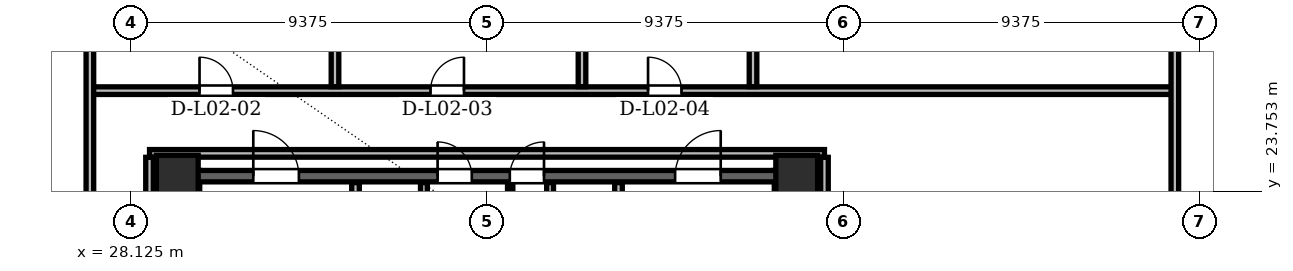
"""IFC4 building model, lengths in metres.
Left out: names, types, materials, properties, quantities, classifications, styles, units other than length and angle.
Written with IfcOpenShell. Run it as: python <this file> out.ifc"""

import sys

from ifc_helpers import new_model, si_unit, direction, frame, frame_2d, origin, origin_2d, place, context, subcontext, project, spatial, rectangle, hollow_rectangle, extrude, element, fill, save


model = new_model("IFC4")
c1 = context("Model", 3, precision=1e-05, world=origin(), true_north=direction((0.0, 1.0)))
c2 = subcontext(c1, "Body", "Model", "MODEL_VIEW")
j1 = project(units=[si_unit("LENGTHUNIT", "METRE"), si_unit("PLANEANGLEUNIT", "RADIAN")], contexts=[c1])
p1 = place(None, origin())
s1 = spatial("IfcSite", under=j1, at=p1, CompositionType="ELEMENT")
p2 = place(p1, origin())
s2 = spatial("IfcBuilding", under=s1, at=p2, CompositionType="ELEMENT")
p3 = place(p2, frame((0.0, 0.0, 9.9)))
s3 = spatial("IfcBuildingStorey", under=s2, at=p3, CompositionType="ELEMENT", Elevation=9.9)
for number, where, z_axis, x_axis in (
    (1, (45.65, 24.15, 0.0), (0.0, 0.0, 1.0), (1.0, 0.0, 0.0)),
    (2, (29.35, 24.15, 0.0), (0.0, 0.0, 1.0), (1.0, 0.0, 0.0)),
):
    element("IfcColumn", number, at=place(p3, frame(where, z_axis=z_axis, x_axis=x_axis)), inside=s3, PredefinedType="COLUMN", context=c2, shape_type="SweptSolid", body=[
        extrude(hollow_rectangle(XDim=1.1, YDim=1.1, WallThickness=0.09, at=origin_2d()), origin(), (0.0, 0.0, 1.0), 4.2),
    ])
for number, where, z_axis, x_axis in (
    (3, (29.64, 11.0, 0.0), (0.0, 0.0, 1.0), (0.0, 1.0, 0.0)),
    (4, (45.36, 11.0, 0.0), (0.0, 0.0, 1.0), (0.0, 1.0, 0.0)),
):
    element("IfcWall", number, at=place(p3, frame(where, z_axis=z_axis, x_axis=x_axis)), inside=s3, PredefinedType="SHEAR", context=c2, shape_type="SweptSolid", body=[
        extrude(rectangle(XDim=13.3, YDim=0.6, at=frame_2d((6.65, 0.0))), origin(), (0.0, 0.0, 1.0), 3.92),
    ])
p4 = place(p3, frame((29.65, 24.15, 0.0), z_axis=(0.0, 0.0, 1.0), x_axis=(1.0, 0.0, 0.0)))
e5 = element("IfcWall", 5, at=p4, inside=s3, PredefinedType="SHEAR", context=c2, shape_type="SweptSolid", body=[
    extrude(rectangle(XDim=15.7, YDim=0.3, at=frame_2d((7.85, 0.0))), origin(), (0.0, 0.0, 1.0), 3.92),
])
p5 = place(p4, frame((1.7, 0.0, 0.0)))
e6 = element("IfcOpeningElement", 6, at=p5, cuts=e5, PredefinedType="OPENING", context=c2, shape_type="SweptSolid", body=[
    extrude(rectangle(XDim=1.2, YDim=2.2, at=frame_2d((0.6, 1.1))), frame((0.0, 0.15, 0.0), z_axis=(0.0, -1.0, 0.0), x_axis=(1.0, 0.0, 0.0)), (0.0, 0.0, 1.0), 0.3),
])
p6 = place(p4, frame((12.8, 0.0, 0.0)))
e7 = element("IfcOpeningElement", 7, at=p6, cuts=e5, PredefinedType="OPENING", context=c2, shape_type="SweptSolid", body=[
    extrude(rectangle(XDim=1.2, YDim=2.2, at=frame_2d((0.6, 1.1))), frame((0.0, 0.15, 0.0), z_axis=(0.0, -1.0, 0.0), x_axis=(1.0, 0.0, 0.0)), (0.0, 0.0, 1.0), 0.3),
])
p7 = place(p4, frame((6.55, 0.0, 0.0)))
e8 = element("IfcOpeningElement", 8, at=p7, cuts=e5, PredefinedType="OPENING", context=c2, shape_type="SweptSolid", body=[
    extrude(rectangle(XDim=0.9, YDim=2.05, at=frame_2d((0.45, 1.025))), frame((0.0, 0.15, 0.0), z_axis=(0.0, -1.0, 0.0), x_axis=(1.0, 0.0, 0.0)), (0.0, 0.0, 1.0), 0.3),
])
p8 = place(p4, frame((8.45, 0.0, 0.0)))
e9 = element("IfcOpeningElement", 9, at=p8, cuts=e5, PredefinedType="OPENING", context=c2, shape_type="SweptSolid", body=[
    extrude(rectangle(XDim=0.9, YDim=2.05, at=frame_2d((0.45, 1.025))), frame((0.0, 0.15, 0.0), z_axis=(0.0, -1.0, 0.0), x_axis=(1.0, 0.0, 0.0)), (0.0, 0.0, 1.0), 0.3),
])
p9 = place(p3, frame((34.04, 19.48, 0.0), z_axis=(0.0, 0.0, 1.0), x_axis=(0.0, 1.0, 0.0)))
e10 = element("IfcWall", 10, at=p9, inside=s3, PredefinedType="PARTITIONING", context=c2, shape_type="SweptSolid", body=[
    extrude(rectangle(XDim=4.5, YDim=0.2, at=frame_2d((2.25, 0.0))), origin(), (0.0, 0.0, 1.0), 2.96),
])
p10 = place(p9, frame((2.12, 0.0, 0.0)))
e11 = element("IfcOpeningElement", 11, at=p10, cuts=e10, PredefinedType="OPENING", context=c2, shape_type="SweptSolid", body=[
    extrude(rectangle(XDim=1.1, YDim=2.2, at=frame_2d((0.55, 1.1))), frame((0.0, 0.1, 0.0), z_axis=(0.0, -1.0, 0.0), x_axis=(1.0, 0.0, 0.0)), (0.0, 0.0, 1.0), 0.2),
])
p11 = place(p3, frame((35.84, 20.96, 0.0), z_axis=(0.0, 0.0, 1.0), x_axis=(0.0, 1.0, 0.0)))
e12 = element("IfcWall", 12, at=p11, inside=s3, PredefinedType="PARTITIONING", context=c2, shape_type="SweptSolid", body=[
    extrude(rectangle(XDim=3.02, YDim=0.18, at=frame_2d((1.51, 0.0))), origin(), (0.0, 0.0, 1.0), 2.96),
])
p12 = place(p3, frame((40.96, 19.48, 0.0), z_axis=(0.0, 0.0, 1.0), x_axis=(0.0, 1.0, 0.0)))
e13 = element("IfcWall", 13, at=p12, inside=s3, PredefinedType="PARTITIONING", context=c2, shape_type="SweptSolid", body=[
    extrude(rectangle(XDim=4.5, YDim=0.2, at=frame_2d((2.25, 0.0))), origin(), (0.0, 0.0, 1.0), 2.96),
])
p13 = place(p12, frame((2.12, 0.0, 0.0)))
e14 = element("IfcOpeningElement", 14, at=p13, cuts=e13, PredefinedType="OPENING", context=c2, shape_type="SweptSolid", body=[
    extrude(rectangle(XDim=1.1, YDim=2.2, at=frame_2d((0.55, 1.1))), frame((0.0, 0.1, 0.0), z_axis=(0.0, -1.0, 0.0), x_axis=(1.0, 0.0, 0.0)), (0.0, 0.0, 1.0), 0.2),
])
p14 = place(p3, frame((39.16, 20.96, 0.0), z_axis=(0.0, 0.0, 1.0), x_axis=(0.0, 1.0, 0.0)))
e15 = element("IfcWall", 15, at=p14, inside=s3, PredefinedType="PARTITIONING", context=c2, shape_type="SweptSolid", body=[
    extrude(rectangle(XDim=3.02, YDim=0.18, at=frame_2d((1.51, 0.0))), origin(), (0.0, 0.0, 1.0), 2.96),
])
p15 = place(p3, frame((38.11, 21.06, 0.0), z_axis=(0.0, 0.0, 1.0), x_axis=(0.0, 1.0, 0.0)))
e16 = element("IfcWall", 16, at=p15, inside=s3, PredefinedType="PARTITIONING", context=c2, shape_type="SweptSolid", body=[
    extrude(rectangle(XDim=2.92, YDim=0.14, at=frame_2d((1.46, 0.0))), origin(), (0.0, 0.0, 1.0), 2.96),
])
p16 = place(p3, frame((28.62, 24.75, 0.0), z_axis=(0.0, 0.0, 1.0), x_axis=(1.0, 0.0, 0.0)))
e17 = element("IfcWall", 17, at=p16, inside=s3, PredefinedType="PARTITIONING", context=c2, shape_type="SweptSolid", body=[
    extrude(rectangle(XDim=17.76, YDim=0.2, at=frame_2d((8.88, 0.0))), origin(), (0.0, 0.0, 1.0), 2.983),
])
p17 = place(p3, frame((27.05, 26.4, 0.0), z_axis=(0.0, 0.0, 1.0), x_axis=(1.0, 0.0, 0.0)))
e18 = element("IfcWall", 18, at=p17, inside=s3, PredefinedType="PARTITIONING", context=c2, shape_type="SweptSolid", body=[
    extrude(rectangle(XDim=28.55, YDim=0.2, at=frame_2d((14.275, 0.0))), origin(), (0.0, 0.0, 1.0), 2.983),
])
p18 = place(p17, frame((2.885, 0.0, 0.0)))
e19 = element("IfcOpeningElement", 19, at=p18, cuts=e18, PredefinedType="OPENING", context=c2, shape_type="SweptSolid", body=[
    extrude(rectangle(XDim=0.88, YDim=2.08, at=frame_2d((0.44, 1.04))), frame((0.0, 0.1, 0.0), z_axis=(0.0, -1.0, 0.0), x_axis=(1.0, 0.0, 0.0)), (0.0, 0.0, 1.0), 0.2),
])
p19 = place(p17, frame((8.964, 0.0, 0.0)))
e20 = element("IfcOpeningElement", 20, at=p19, cuts=e18, PredefinedType="OPENING", context=c2, shape_type="SweptSolid", body=[
    extrude(rectangle(XDim=0.88, YDim=2.08, at=frame_2d((0.44, 1.04))), frame((0.0, 0.1, 0.0), z_axis=(0.0, -1.0, 0.0), x_axis=(1.0, 0.0, 0.0)), (0.0, 0.0, 1.0), 0.2),
])
p20 = place(p17, frame((14.688, 0.0, 0.0)))
e21 = element("IfcOpeningElement", 21, at=p20, cuts=e18, PredefinedType="OPENING", context=c2, shape_type="SweptSolid", body=[
    extrude(rectangle(XDim=0.88, YDim=2.08, at=frame_2d((0.44, 1.04))), frame((0.0, 0.1, 0.0), z_axis=(0.0, -1.0, 0.0), x_axis=(1.0, 0.0, 0.0)), (0.0, 0.0, 1.0), 0.2),
])
p21 = place(p3, frame((27.05, 10.504, 0.0), z_axis=(0.0, 0.0, 1.0), x_axis=(0.0, 1.0, 0.0)))
e22 = element("IfcWall", 22, at=p21, inside=s3, PredefinedType="PARTITIONING", context=c2, shape_type="SweptSolid", body=[
    extrude(rectangle(XDim=28.376, YDim=0.2, at=frame_2d((14.188, 0.0))), origin(), (0.0, 0.0, 1.0), 2.983),
])
p22 = place(p21, frame((5.975, 0.0, 0.0)))
e23 = element("IfcOpeningElement", 23, at=p22, cuts=e22, PredefinedType="OPENING", context=c2, shape_type="SweptSolid", body=[
    extrude(rectangle(XDim=1.3, YDim=2.2, at=frame_2d((0.65, 1.1))), frame((0.0, 0.1, 0.0), z_axis=(0.0, -1.0, 0.0), x_axis=(1.0, 0.0, 0.0)), (0.0, 0.0, 1.0), 0.2),
])
p23 = place(p3, frame((28.62, 10.504, 0.0), z_axis=(0.0, 0.0, 1.0), x_axis=(0.0, 1.0, 0.0)))
e24 = element("IfcWall", 24, at=p23, inside=s3, PredefinedType="PARTITIONING", context=c2, shape_type="SweptSolid", body=[
    extrude(rectangle(XDim=14.142, YDim=0.2, at=frame_2d((7.071, 0.0))), origin(), (0.0, 0.0, 1.0), 2.983),
])
for number, where, z_axis, x_axis in (
    (25, (33.5, 26.504, 0.0), (0.0, 0.0, 1.0), (0.0, 1.0, 0.0)),
    (26, (40.0, 26.504, 0.0), (0.0, 0.0, 1.0), (0.0, 1.0, 0.0)),
):
    element("IfcWall", number, at=place(p3, frame(where, z_axis=z_axis, x_axis=x_axis)), inside=s3, PredefinedType="PARTITIONING", context=c2, shape_type="SweptSolid", body=[
        extrude(rectangle(XDim=6.892, YDim=0.2, at=frame_2d((3.446, 0.0))), origin(), (0.0, 0.0, 1.0), 3.92),
    ])
p24 = place(p3, frame((44.5, 26.504, 0.0), z_axis=(0.0, 0.0, 1.0), x_axis=(0.0, 1.0, 0.0)))
e27 = element("IfcWall", 27, at=p24, inside=s3, PredefinedType="PARTITIONING", context=c2, shape_type="SweptSolid", body=[
    extrude(rectangle(XDim=3.592, YDim=0.2, at=frame_2d((1.796, 0.0))), origin(), (0.0, 0.0, 1.0), 3.92),
])
p25 = place(p3, frame((46.38, 10.504, 0.0), z_axis=(0.0, 0.0, 1.0), x_axis=(0.0, 1.0, 0.0)))
e28 = element("IfcWall", 28, at=p25, inside=s3, PredefinedType="PARTITIONING", context=c2, shape_type="SweptSolid", body=[
    extrude(rectangle(XDim=14.142, YDim=0.2, at=frame_2d((7.071, 0.0))), origin(), (0.0, 0.0, 1.0), 3.92),
])
p26 = place(p3, frame((55.6, 18.889, 0.0), z_axis=(0.0, 0.0, 1.0), x_axis=(0.0, 1.0, 0.0)))
e29 = element("IfcWall", 29, at=p26, inside=s3, PredefinedType="PARTITIONING", context=c2, shape_type="SweptSolid", body=[
    extrude(rectangle(XDim=24.867, YDim=0.2, at=frame_2d((12.433, 0.0))), origin(), (0.0, 0.0, 1.0), 2.71),
])
p27 = place(p26, frame((2.356, 0.0, 0.0)))
e30 = element("IfcOpeningElement", 30, at=p27, cuts=e29, PredefinedType="OPENING", context=c2, shape_type="SweptSolid", body=[
    extrude(rectangle(XDim=1.3, YDim=2.2, at=frame_2d((0.65, 1.1))), frame((0.0, 0.1, 0.0), z_axis=(0.0, -1.0, 0.0), x_axis=(1.0, 0.0, 0.0)), (0.0, 0.0, 1.0), 0.2),
])
p28 = place(p5, origin())
e31 = element("IfcDoor", 31, at=p28, inside=s3, OperationType="SINGLE_SWING_LEFT", PredefinedType="DOOR", context=c2, shape_type="SweptSolid", body=[
    extrude(rectangle(XDim=1.2, YDim=2.2, at=frame_2d((0.6, 1.1))), frame((0.0, 0.025, 0.0), z_axis=(0.0, -1.0, 0.0), x_axis=(1.0, 0.0, 0.0)), (0.0, 0.0, 1.0), 0.05),
])
fill(e6, e31)
p29 = place(p6, origin())
e32 = element("IfcDoor", 32, at=p29, inside=s3, OperationType="SINGLE_SWING_RIGHT", PredefinedType="DOOR", context=c2, shape_type="SweptSolid", body=[
    extrude(rectangle(XDim=1.2, YDim=2.2, at=frame_2d((0.6, 1.1))), frame((0.0, 0.025, 0.0), z_axis=(0.0, -1.0, 0.0), x_axis=(1.0, 0.0, 0.0)), (0.0, 0.0, 1.0), 0.05),
])
fill(e7, e32)
p30 = place(p7, origin())
e33 = element("IfcDoor", 33, at=p30, inside=s3, OperationType="SINGLE_SWING_LEFT", PredefinedType="DOOR", context=c2, shape_type="SweptSolid", body=[
    extrude(rectangle(XDim=0.9, YDim=2.05, at=frame_2d((0.45, 1.025))), frame((0.0, 0.025, 0.0), z_axis=(0.0, -1.0, 0.0), x_axis=(1.0, 0.0, 0.0)), (0.0, 0.0, 1.0), 0.05),
])
fill(e8, e33)
p31 = place(p8, origin())
e34 = element("IfcDoor", 34, at=p31, inside=s3, OperationType="SINGLE_SWING_RIGHT", PredefinedType="DOOR", context=c2, shape_type="SweptSolid", body=[
    extrude(rectangle(XDim=0.9, YDim=2.05, at=frame_2d((0.45, 1.025))), frame((0.0, 0.025, 0.0), z_axis=(0.0, -1.0, 0.0), x_axis=(1.0, 0.0, 0.0)), (0.0, 0.0, 1.0), 0.05),
])
fill(e9, e34)
p32 = place(p18, origin())
e35 = element("IfcDoor", 35, at=p32, inside=s3, OperationType="SINGLE_SWING_LEFT", PredefinedType="DOOR", context=c2, shape_type="SweptSolid", body=[
    extrude(rectangle(XDim=0.88, YDim=2.08, at=frame_2d((0.44, 1.04))), frame((0.0, 0.025, 0.0), z_axis=(0.0, -1.0, 0.0), x_axis=(1.0, 0.0, 0.0)), (0.0, 0.0, 1.0), 0.05),
])
fill(e19, e35)
p33 = place(p19, origin())
e36 = element("IfcDoor", 36, at=p33, inside=s3, OperationType="SINGLE_SWING_RIGHT", PredefinedType="DOOR", context=c2, shape_type="SweptSolid", body=[
    extrude(rectangle(XDim=0.88, YDim=2.08, at=frame_2d((0.44, 1.04))), frame((0.0, 0.025, 0.0), z_axis=(0.0, -1.0, 0.0), x_axis=(1.0, 0.0, 0.0)), (0.0, 0.0, 1.0), 0.05),
])
fill(e20, e36)
p34 = place(p20, origin())
e37 = element("IfcDoor", 37, at=p34, inside=s3, OperationType="SINGLE_SWING_LEFT", PredefinedType="DOOR", context=c2, shape_type="SweptSolid", body=[
    extrude(rectangle(XDim=0.88, YDim=2.08, at=frame_2d((0.44, 1.04))), frame((0.0, 0.025, 0.0), z_axis=(0.0, -1.0, 0.0), x_axis=(1.0, 0.0, 0.0)), (0.0, 0.0, 1.0), 0.05),
])
fill(e21, e37)
save(model, sys.argv[1])
